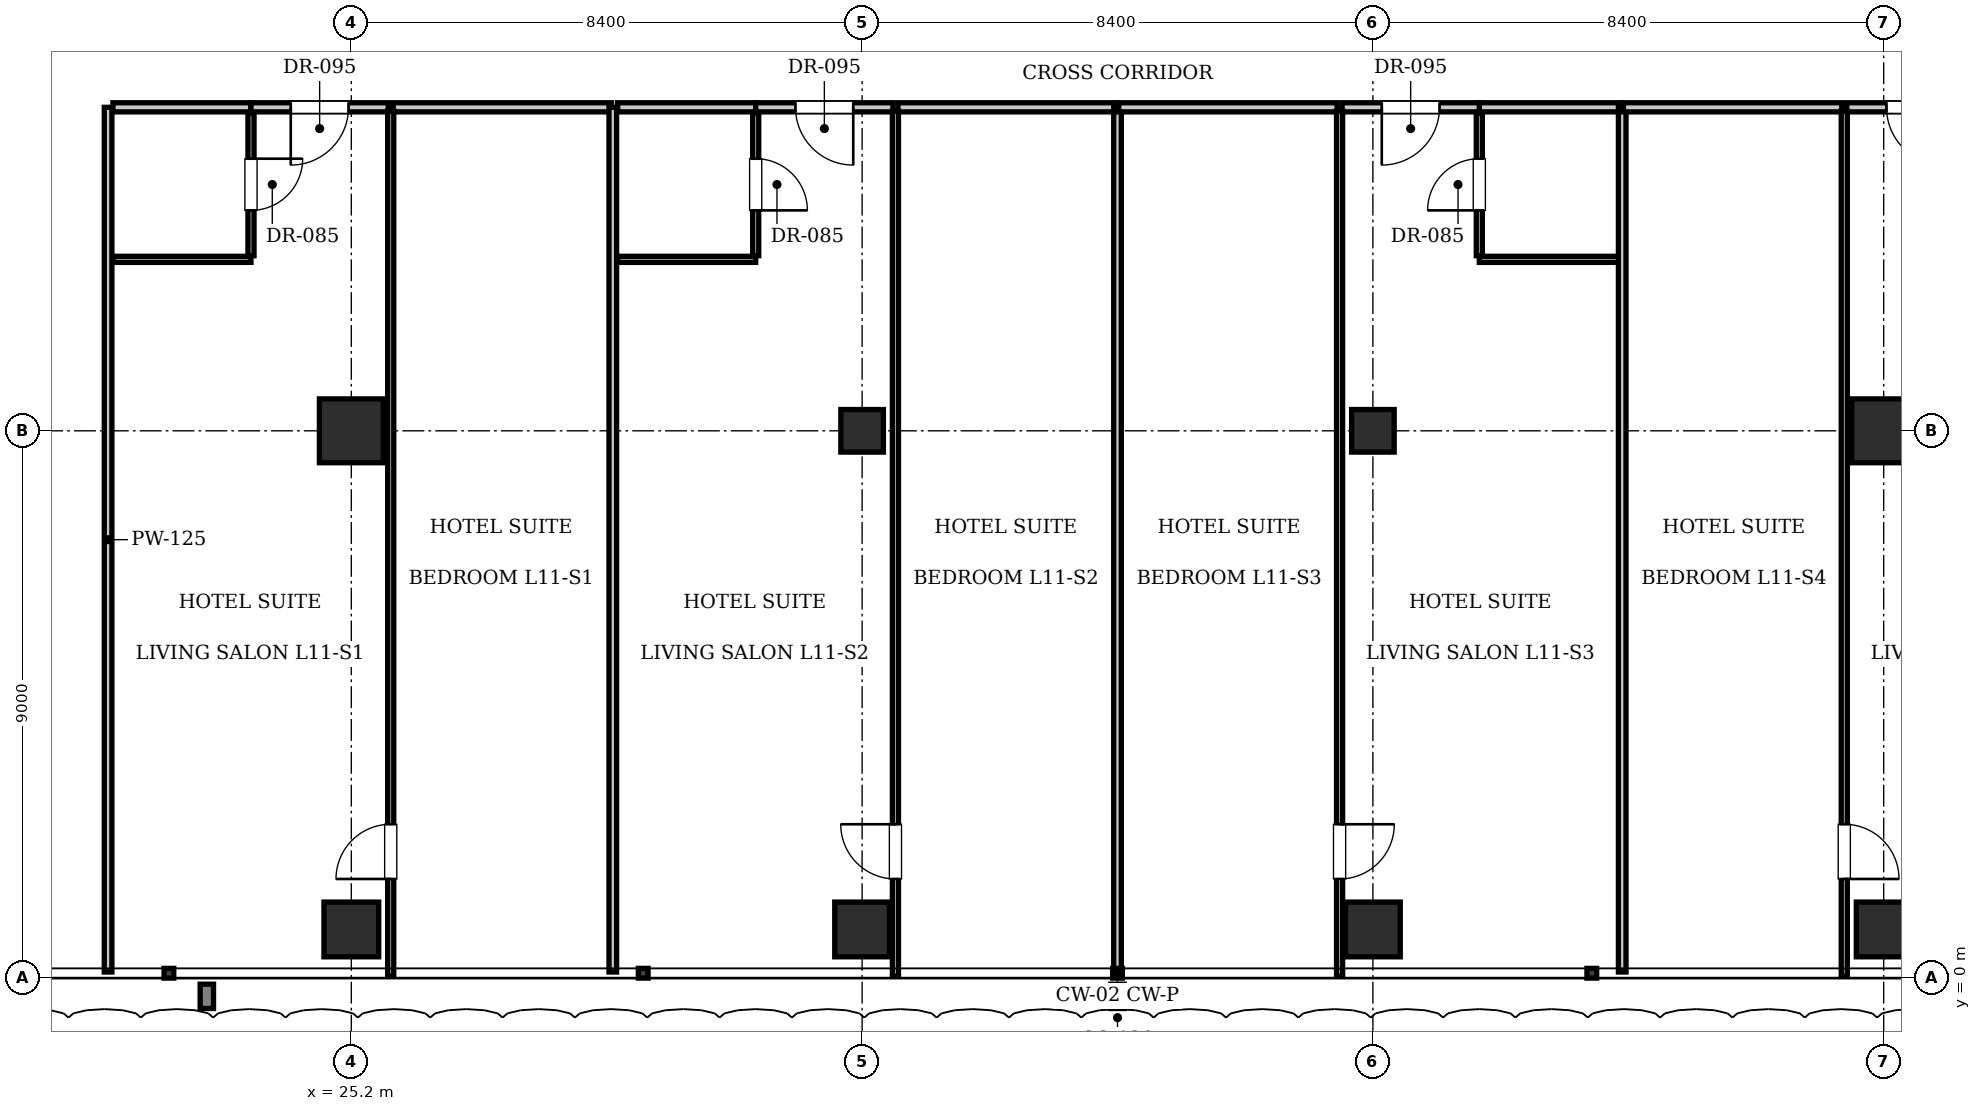
"""IFC4 building model, lengths in metres.
Left out: names, types, materials, properties, quantities, classifications, styles, units other than length and angle.
Written with IfcOpenShell. Run it as: python <this file> out.ifc"""

import sys

from ifc_helpers import new_model, si_unit, direction, frame, frame_2d, origin, origin_2d, place, context, subcontext, project, spatial, rectangle, i_section, extrude, element, fill, save


model = new_model("IFC4")
c1 = context("Model", 3, precision=1e-05, world=origin(), true_north=direction((0.0, 1.0)))
c2 = subcontext(c1, "Body", "Model", "MODEL_VIEW")
j1 = project(units=[si_unit("LENGTHUNIT", "METRE"), si_unit("PLANEANGLEUNIT", "RADIAN")], contexts=[c1])
p1 = place(None, origin())
s1 = spatial("IfcSite", under=j1, at=p1, CompositionType="ELEMENT")
p2 = place(p1, origin())
s2 = spatial("IfcBuilding", under=s1, at=p2, CompositionType="ELEMENT")
p3 = place(p2, frame((0.0, 0.0, 50.05)))
s3 = spatial("IfcBuildingStorey", under=s2, at=p3, CompositionType="ELEMENT", Elevation=50.05)
for number, where, z_axis, x_axis in (
    (1, (25.2, 9.0, 0.0), (0.0, 0.0, 1.0), (1.0, 0.0, 0.0)),
    (2, (50.4, 9.0, 0.0), (0.0, 0.0, 1.0), (1.0, 0.0, 0.0)),
):
    element("IfcColumn", number, at=place(p3, frame(where, z_axis=z_axis, x_axis=x_axis)), inside=s3, PredefinedType="COLUMN", context=c2, shape_type="SweptSolid", body=[
        extrude(rectangle(XDim=1.05, YDim=1.05, at=origin_2d()), origin(), (0.0, 0.0, 1.0), 3.85),
    ])
for number, where, z_axis, x_axis in (
    (3, (33.6, 9.0, 0.0), (0.0, 0.0, 1.0), (1.0, 0.0, 0.0)),
    (4, (42.0, 9.0, 0.0), (0.0, 0.0, 1.0), (1.0, 0.0, 0.0)),
):
    element("IfcColumn", number, at=place(p3, frame(where, z_axis=z_axis, x_axis=x_axis)), inside=s3, PredefinedType="COLUMN", context=c2, shape_type="SweptSolid", body=[
        extrude(i_section(OverallWidth=0.7, OverallDepth=0.7, WebThickness=0.028, FlangeThickness=0.044, at=origin_2d()), origin(), (0.0, 0.0, 1.0), 3.85),
    ])
for number, where, z_axis, x_axis in (
    (5, (25.2, 0.8, 0.0), (0.0, 0.0, 1.0), (1.0, 0.0, 0.0)),
    (6, (33.6, 0.8, 0.0), (0.0, 0.0, 1.0), (1.0, 0.0, 0.0)),
    (7, (42.0, 0.8, 0.0), (0.0, 0.0, 1.0), (1.0, 0.0, 0.0)),
    (8, (50.4, 0.8, 0.0), (0.0, 0.0, 1.0), (1.0, 0.0, 0.0)),
):
    element("IfcColumn", number, at=place(p3, frame(where, z_axis=z_axis, x_axis=x_axis)), inside=s3, PredefinedType="COLUMN", context=c2, shape_type="SweptSolid", body=[
        extrude(rectangle(XDim=0.9, YDim=0.9, at=origin_2d()), origin(), (0.0, 0.0, 1.0), 3.85),
    ])
p4 = place(p3, frame((21.2, 0.1, 0.0), z_axis=(0.0, 0.0, 1.0), x_axis=(0.0, 1.0, 0.0)))
e9 = element("IfcWall", 9, at=p4, inside=s3, PredefinedType="PARTITIONING", context=c2, shape_type="SweptSolid", body=[
    extrude(rectangle(XDim=14.22, YDim=0.125, at=frame_2d((7.11, 0.0))), origin(), (0.0, 0.0, 1.0), 3.61),
])
p5 = place(p3, frame((21.28, 14.32, 0.0), z_axis=(0.0, 0.0, 1.0), x_axis=(1.0, 0.0, 0.0)))
e10 = element("IfcWall", 10, at=p5, inside=s3, PredefinedType="PARTITIONING", context=c2, shape_type="SweptSolid", body=[
    extrude(rectangle(XDim=2.27, YDim=0.15, at=frame_2d((1.135, 0.0))), origin(), (0.0, 0.0, 1.0), 3.61),
])
p6 = place(p3, frame((21.28, 11.82, 0.0), z_axis=(0.0, 0.0, 1.0), x_axis=(1.0, 0.0, 0.0)))
e11 = element("IfcWall", 11, at=p6, inside=s3, PredefinedType="PARTITIONING", context=c2, shape_type="SweptSolid", body=[
    extrude(rectangle(XDim=2.27, YDim=0.1, at=frame_2d((1.135, 0.0))), origin(), (0.0, 0.0, 1.0), 3.61),
])
p7 = place(p3, frame((23.55, 11.88, 0.0), z_axis=(0.0, 0.0, 1.0), x_axis=(0.0, 1.0, 0.0)))
e12 = element("IfcWall", 12, at=p7, inside=s3, PredefinedType="PARTITIONING", context=c2, shape_type="SweptSolid", body=[
    extrude(rectangle(XDim=2.34, YDim=0.1, at=frame_2d((1.17, 0.0))), origin(), (0.0, 0.0, 1.0), 3.61),
])
p8 = place(p7, frame((0.745, 0.0, 0.0)))
e13 = element("IfcOpeningElement", 13, at=p8, cuts=e12, PredefinedType="OPENING", context=c2, shape_type="SweptSolid", body=[
    extrude(rectangle(XDim=0.85, YDim=2.1, at=frame_2d((0.425, 1.05))), frame((0.0, 0.06, 0.0), z_axis=(0.0, -1.0, 0.0), x_axis=(1.0, 0.0, 0.0)), (0.0, 0.0, 1.0), 0.12),
])
p9 = place(p3, frame((23.55, 14.32, 0.0), z_axis=(0.0, 0.0, 1.0), x_axis=(1.0, 0.0, 0.0)))
e14 = element("IfcWall", 14, at=p9, inside=s3, PredefinedType="PARTITIONING", context=c2, shape_type="SweptSolid", body=[
    extrude(rectangle(XDim=2.258, YDim=0.15, at=frame_2d((1.129, 0.0))), origin(), (0.0, 0.0, 1.0), 3.61),
])
p10 = place(p9, frame((0.654, 0.0, 0.0)))
e15 = element("IfcOpeningElement", 15, at=p10, cuts=e14, PredefinedType="OPENING", context=c2, shape_type="SweptSolid", body=[
    extrude(rectangle(XDim=0.95, YDim=2.15, at=frame_2d((0.475, 1.075))), frame((0.0, 0.085, 0.0), z_axis=(0.0, -1.0, 0.0), x_axis=(1.0, 0.0, 0.0)), (0.0, 0.0, 1.0), 0.17),
])
p11 = place(p3, frame((25.888, 14.32, 0.0), z_axis=(0.0, 0.0, 1.0), x_axis=(1.0, 0.0, 0.0)))
e16 = element("IfcWall", 16, at=p11, inside=s3, PredefinedType="PARTITIONING", context=c2, shape_type="SweptSolid", body=[
    extrude(rectangle(XDim=3.592, YDim=0.15, at=frame_2d((1.796, 0.0))), origin(), (0.0, 0.0, 1.0), 3.61),
])
p12 = place(p3, frame((25.848, 0.03, 0.0), z_axis=(0.0, 0.0, 1.0), x_axis=(0.0, 1.0, 0.0)))
e17 = element("IfcWall", 17, at=p12, inside=s3, PredefinedType="PARTITIONING", context=c2, shape_type="SweptSolid", body=[
    extrude(rectangle(XDim=14.23, YDim=0.1, at=frame_2d((7.115, 0.0))), origin(), (0.0, 0.0, 1.0), 3.61),
])
p13 = place(p12, frame((1.6, 0.0, 0.0)))
e18 = element("IfcOpeningElement", 18, at=p13, cuts=e17, PredefinedType="OPENING", context=c2, shape_type="SweptSolid", body=[
    extrude(rectangle(XDim=0.9, YDim=2.1, at=frame_2d((0.45, 1.05))), frame((0.0, 0.06, 0.0), z_axis=(0.0, -1.0, 0.0), x_axis=(1.0, 0.0, 0.0)), (0.0, 0.0, 1.0), 0.12),
])
p14 = place(p3, frame((29.5, 0.1, 0.0), z_axis=(0.0, 0.0, 1.0), x_axis=(0.0, 1.0, 0.0)))
e19 = element("IfcWall", 19, at=p14, inside=s3, PredefinedType="PARTITIONING", context=c2, shape_type="SweptSolid", body=[
    extrude(rectangle(XDim=14.22, YDim=0.125, at=frame_2d((7.11, 0.0))), origin(), (0.0, 0.0, 1.0), 3.255),
])
p15 = place(p3, frame((29.58, 14.32, 0.0), z_axis=(0.0, 0.0, 1.0), x_axis=(1.0, 0.0, 0.0)))
e20 = element("IfcWall", 20, at=p15, inside=s3, PredefinedType="PARTITIONING", context=c2, shape_type="SweptSolid", body=[
    extrude(rectangle(XDim=2.27, YDim=0.15, at=frame_2d((1.135, 0.0))), origin(), (0.0, 0.0, 1.0), 3.61),
])
p16 = place(p3, frame((29.58, 11.82, 0.0), z_axis=(0.0, 0.0, 1.0), x_axis=(1.0, 0.0, 0.0)))
e21 = element("IfcWall", 21, at=p16, inside=s3, PredefinedType="PARTITIONING", context=c2, shape_type="SweptSolid", body=[
    extrude(rectangle(XDim=2.27, YDim=0.1, at=frame_2d((1.135, 0.0))), origin(), (0.0, 0.0, 1.0), 3.61),
])
p17 = place(p3, frame((31.85, 11.88, 0.0), z_axis=(0.0, 0.0, 1.0), x_axis=(0.0, 1.0, 0.0)))
e22 = element("IfcWall", 22, at=p17, inside=s3, PredefinedType="PARTITIONING", context=c2, shape_type="SweptSolid", body=[
    extrude(rectangle(XDim=2.34, YDim=0.1, at=frame_2d((1.17, 0.0))), origin(), (0.0, 0.0, 1.0), 3.61),
])
p18 = place(p17, frame((0.745, 0.0, 0.0)))
e23 = element("IfcOpeningElement", 23, at=p18, cuts=e22, PredefinedType="OPENING", context=c2, shape_type="SweptSolid", body=[
    extrude(rectangle(XDim=0.85, YDim=2.1, at=frame_2d((0.425, 1.05))), frame((0.0, 0.06, 0.0), z_axis=(0.0, -1.0, 0.0), x_axis=(1.0, 0.0, 0.0)), (0.0, 0.0, 1.0), 0.12),
])
p19 = place(p3, frame((31.85, 14.32, 0.0), z_axis=(0.0, 0.0, 1.0), x_axis=(1.0, 0.0, 0.0)))
e24 = element("IfcWall", 24, at=p19, inside=s3, PredefinedType="PARTITIONING", context=c2, shape_type="SweptSolid", body=[
    extrude(rectangle(XDim=2.258, YDim=0.15, at=frame_2d((1.129, 0.0))), origin(), (0.0, 0.0, 1.0), 3.61),
])
p20 = place(p19, frame((0.654, 0.0, 0.0)))
e25 = element("IfcOpeningElement", 25, at=p20, cuts=e24, PredefinedType="OPENING", context=c2, shape_type="SweptSolid", body=[
    extrude(rectangle(XDim=0.95, YDim=2.15, at=frame_2d((0.475, 1.075))), frame((0.0, 0.085, 0.0), z_axis=(0.0, -1.0, 0.0), x_axis=(1.0, 0.0, 0.0)), (0.0, 0.0, 1.0), 0.17),
])
p21 = place(p3, frame((34.188, 14.32, 0.0), z_axis=(0.0, 0.0, 1.0), x_axis=(1.0, 0.0, 0.0)))
e26 = element("IfcWall", 26, at=p21, inside=s3, PredefinedType="PARTITIONING", context=c2, shape_type="SweptSolid", body=[
    extrude(rectangle(XDim=3.592, YDim=0.15, at=frame_2d((1.796, 0.0))), origin(), (0.0, 0.0, 1.0), 3.61),
])
p22 = place(p3, frame((34.148, 0.03, 0.0), z_axis=(0.0, 0.0, 1.0), x_axis=(0.0, 1.0, 0.0)))
e27 = element("IfcWall", 27, at=p22, inside=s3, PredefinedType="PARTITIONING", context=c2, shape_type="SweptSolid", body=[
    extrude(rectangle(XDim=14.23, YDim=0.1, at=frame_2d((7.115, 0.0))), origin(), (0.0, 0.0, 1.0), 3.61),
])
p23 = place(p22, frame((1.6, 0.0, 0.0)))
e28 = element("IfcOpeningElement", 28, at=p23, cuts=e27, PredefinedType="OPENING", context=c2, shape_type="SweptSolid", body=[
    extrude(rectangle(XDim=0.9, YDim=2.1, at=frame_2d((0.45, 1.05))), frame((0.0, 0.06, 0.0), z_axis=(0.0, -1.0, 0.0), x_axis=(1.0, 0.0, 0.0)), (0.0, 0.0, 1.0), 0.12),
])
p24 = place(p3, frame((37.8, 0.1, 0.0), z_axis=(0.0, 0.0, 1.0), x_axis=(0.0, 1.0, 0.0)))
e29 = element("IfcWall", 29, at=p24, inside=s3, PredefinedType="PARTITIONING", context=c2, shape_type="SweptSolid", body=[
    extrude(rectangle(XDim=14.22, YDim=0.125, at=frame_2d((7.11, 0.0))), origin(), (0.0, 0.0, 1.0), 3.293),
])
p25 = place(p3, frame((43.75, 14.32, 0.0), z_axis=(0.0, 0.0, 1.0), x_axis=(1.0, 0.0, 0.0)))
e30 = element("IfcWall", 30, at=p25, inside=s3, PredefinedType="PARTITIONING", context=c2, shape_type="SweptSolid", body=[
    extrude(rectangle(XDim=2.33, YDim=0.15, at=frame_2d((1.165, 0.0))), origin(), (0.0, 0.0, 1.0), 3.61),
])
p26 = place(p3, frame((43.75, 11.82, 0.0), z_axis=(0.0, 0.0, 1.0), x_axis=(1.0, 0.0, 0.0)))
e31 = element("IfcWall", 31, at=p26, inside=s3, PredefinedType="PARTITIONING", context=c2, shape_type="SweptSolid", body=[
    extrude(rectangle(XDim=2.31, YDim=0.1, at=frame_2d((1.155, 0.0))), origin(), (0.0, 0.0, 1.0), 3.61),
])
p27 = place(p3, frame((43.75, 11.88, 0.0), z_axis=(0.0, 0.0, 1.0), x_axis=(0.0, 1.0, 0.0)))
e32 = element("IfcWall", 32, at=p27, inside=s3, PredefinedType="PARTITIONING", context=c2, shape_type="SweptSolid", body=[
    extrude(rectangle(XDim=2.34, YDim=0.1, at=frame_2d((1.17, 0.0))), origin(), (0.0, 0.0, 1.0), 3.61),
])
p28 = place(p27, frame((0.745, 0.0, 0.0)))
e33 = element("IfcOpeningElement", 33, at=p28, cuts=e32, PredefinedType="OPENING", context=c2, shape_type="SweptSolid", body=[
    extrude(rectangle(XDim=0.85, YDim=2.1, at=frame_2d((0.425, 1.05))), frame((0.0, 0.06, 0.0), z_axis=(0.0, -1.0, 0.0), x_axis=(1.0, 0.0, 0.0)), (0.0, 0.0, 1.0), 0.12),
])
p29 = place(p3, frame((37.82, 14.32, 0.0), z_axis=(0.0, 0.0, 1.0), x_axis=(1.0, 0.0, 0.0)))
e34 = element("IfcWall", 34, at=p29, inside=s3, PredefinedType="PARTITIONING", context=c2, shape_type="SweptSolid", body=[
    extrude(rectangle(XDim=3.592, YDim=0.15, at=frame_2d((1.796, 0.0))), origin(), (0.0, 0.0, 1.0), 3.61),
])
p30 = place(p3, frame((41.492, 14.32, 0.0), z_axis=(0.0, 0.0, 1.0), x_axis=(1.0, 0.0, 0.0)))
e35 = element("IfcWall", 35, at=p30, inside=s3, PredefinedType="PARTITIONING", context=c2, shape_type="SweptSolid", body=[
    extrude(rectangle(XDim=2.258, YDim=0.15, at=frame_2d((1.129, 0.0))), origin(), (0.0, 0.0, 1.0), 3.61),
])
p31 = place(p30, frame((0.654, 0.0, 0.0)))
e36 = element("IfcOpeningElement", 36, at=p31, cuts=e35, PredefinedType="OPENING", context=c2, shape_type="SweptSolid", body=[
    extrude(rectangle(XDim=0.95, YDim=2.15, at=frame_2d((0.475, 1.075))), frame((0.0, 0.085, 0.0), z_axis=(0.0, -1.0, 0.0), x_axis=(1.0, 0.0, 0.0)), (0.0, 0.0, 1.0), 0.17),
])
p32 = place(p3, frame((41.452, 0.03, 0.0), z_axis=(0.0, 0.0, 1.0), x_axis=(0.0, 1.0, 0.0)))
e37 = element("IfcWall", 37, at=p32, inside=s3, PredefinedType="PARTITIONING", context=c2, shape_type="SweptSolid", body=[
    extrude(rectangle(XDim=14.23, YDim=0.1, at=frame_2d((7.115, 0.0))), origin(), (0.0, 0.0, 1.0), 3.61),
])
p33 = place(p32, frame((1.6, 0.0, 0.0)))
e38 = element("IfcOpeningElement", 38, at=p33, cuts=e37, PredefinedType="OPENING", context=c2, shape_type="SweptSolid", body=[
    extrude(rectangle(XDim=0.9, YDim=2.1, at=frame_2d((0.45, 1.05))), frame((0.0, 0.06, 0.0), z_axis=(0.0, -1.0, 0.0), x_axis=(1.0, 0.0, 0.0)), (0.0, 0.0, 1.0), 0.12),
])
p34 = place(p3, frame((46.1, 0.1, 0.0), z_axis=(0.0, 0.0, 1.0), x_axis=(0.0, 1.0, 0.0)))
e39 = element("IfcWall", 39, at=p34, inside=s3, PredefinedType="PARTITIONING", context=c2, shape_type="SweptSolid", body=[
    extrude(rectangle(XDim=14.22, YDim=0.125, at=frame_2d((7.11, 0.0))), origin(), (0.0, 0.0, 1.0), 3.344),
])
p35 = place(p3, frame((46.12, 14.32, 0.0), z_axis=(0.0, 0.0, 1.0), x_axis=(1.0, 0.0, 0.0)))
e40 = element("IfcWall", 40, at=p35, inside=s3, PredefinedType="PARTITIONING", context=c2, shape_type="SweptSolid", body=[
    extrude(rectangle(XDim=3.592, YDim=0.15, at=frame_2d((1.796, 0.0))), origin(), (0.0, 0.0, 1.0), 3.61),
])
p36 = place(p3, frame((49.792, 14.32, 0.0), z_axis=(0.0, 0.0, 1.0), x_axis=(1.0, 0.0, 0.0)))
e41 = element("IfcWall", 41, at=p36, inside=s3, PredefinedType="PARTITIONING", context=c2, shape_type="SweptSolid", body=[
    extrude(rectangle(XDim=2.258, YDim=0.15, at=frame_2d((1.129, 0.0))), origin(), (0.0, 0.0, 1.0), 3.61),
])
p37 = place(p36, frame((0.654, 0.0, 0.0)))
e42 = element("IfcOpeningElement", 42, at=p37, cuts=e41, PredefinedType="OPENING", context=c2, shape_type="SweptSolid", body=[
    extrude(rectangle(XDim=0.95, YDim=2.15, at=frame_2d((0.475, 1.075))), frame((0.0, 0.085, 0.0), z_axis=(0.0, -1.0, 0.0), x_axis=(1.0, 0.0, 0.0)), (0.0, 0.0, 1.0), 0.17),
])
p38 = place(p3, frame((49.752, 0.03, 0.0), z_axis=(0.0, 0.0, 1.0), x_axis=(0.0, 1.0, 0.0)))
e43 = element("IfcWall", 43, at=p38, inside=s3, PredefinedType="PARTITIONING", context=c2, shape_type="SweptSolid", body=[
    extrude(rectangle(XDim=14.23, YDim=0.1, at=frame_2d((7.115, 0.0))), origin(), (0.0, 0.0, 1.0), 3.61),
])
p39 = place(p38, frame((1.6, 0.0, 0.0)))
e44 = element("IfcOpeningElement", 44, at=p39, cuts=e43, PredefinedType="OPENING", context=c2, shape_type="SweptSolid", body=[
    extrude(rectangle(XDim=0.9, YDim=2.1, at=frame_2d((0.45, 1.05))), frame((0.0, 0.06, 0.0), z_axis=(0.0, -1.0, 0.0), x_axis=(1.0, 0.0, 0.0)), (0.0, 0.0, 1.0), 0.12),
])
p40 = place(p8, frame((0.85, 0.0, 0.0), z_axis=(0.0, 0.0, 1.0), x_axis=(-1.0, 0.0, 0.0)))
e45 = element("IfcDoor", 45, at=p40, inside=s3, OperationType="SINGLE_SWING_LEFT", PredefinedType="DOOR", context=c2, shape_type="SweptSolid", body=[
    extrude(rectangle(XDim=0.85, YDim=2.1, at=frame_2d((0.425, 1.05))), frame((0.0, 0.025, 0.0), z_axis=(0.0, -1.0, 0.0), x_axis=(1.0, 0.0, 0.0)), (0.0, 0.0, 1.0), 0.05),
])
fill(e13, e45)
p41 = place(p10, frame((0.95, 0.0, 0.0), z_axis=(0.0, 0.0, 1.0), x_axis=(-1.0, 0.0, 0.0)))
e46 = element("IfcDoor", 46, at=p41, inside=s3, OperationType="SINGLE_SWING_RIGHT", PredefinedType="DOOR", context=c2, shape_type="SweptSolid", body=[
    extrude(rectangle(XDim=0.95, YDim=2.15, at=frame_2d((0.475, 1.075))), frame((0.0, 0.025, 0.0), z_axis=(0.0, -1.0, 0.0), x_axis=(1.0, 0.0, 0.0)), (0.0, 0.0, 1.0), 0.05),
])
fill(e15, e46)
p42 = place(p13, origin())
e47 = element("IfcDoor", 47, at=p42, inside=s3, OperationType="SINGLE_SWING_LEFT", PredefinedType="DOOR", context=c2, shape_type="SweptSolid", body=[
    extrude(rectangle(XDim=0.9, YDim=2.1, at=frame_2d((0.45, 1.05))), frame((0.0, 0.025, 0.0), z_axis=(0.0, -1.0, 0.0), x_axis=(1.0, 0.0, 0.0)), (0.0, 0.0, 1.0), 0.05),
])
fill(e18, e47)
p43 = place(p18, frame((0.85, 0.0, 0.0), z_axis=(0.0, 0.0, 1.0), x_axis=(-1.0, 0.0, 0.0)))
e48 = element("IfcDoor", 48, at=p43, inside=s3, OperationType="SINGLE_SWING_RIGHT", PredefinedType="DOOR", context=c2, shape_type="SweptSolid", body=[
    extrude(rectangle(XDim=0.85, YDim=2.1, at=frame_2d((0.425, 1.05))), frame((0.0, 0.025, 0.0), z_axis=(0.0, -1.0, 0.0), x_axis=(1.0, 0.0, 0.0)), (0.0, 0.0, 1.0), 0.05),
])
fill(e23, e48)
p44 = place(p20, frame((0.95, 0.0, 0.0), z_axis=(0.0, 0.0, 1.0), x_axis=(-1.0, 0.0, 0.0)))
e49 = element("IfcDoor", 49, at=p44, inside=s3, OperationType="SINGLE_SWING_LEFT", PredefinedType="DOOR", context=c2, shape_type="SweptSolid", body=[
    extrude(rectangle(XDim=0.95, YDim=2.15, at=frame_2d((0.475, 1.075))), frame((0.0, 0.025, 0.0), z_axis=(0.0, -1.0, 0.0), x_axis=(1.0, 0.0, 0.0)), (0.0, 0.0, 1.0), 0.05),
])
fill(e25, e49)
p45 = place(p23, origin())
e50 = element("IfcDoor", 50, at=p45, inside=s3, OperationType="SINGLE_SWING_RIGHT", PredefinedType="DOOR", context=c2, shape_type="SweptSolid", body=[
    extrude(rectangle(XDim=0.9, YDim=2.1, at=frame_2d((0.45, 1.05))), frame((0.0, 0.025, 0.0), z_axis=(0.0, -1.0, 0.0), x_axis=(1.0, 0.0, 0.0)), (0.0, 0.0, 1.0), 0.05),
])
fill(e28, e50)
p46 = place(p28, origin())
e51 = element("IfcDoor", 51, at=p46, inside=s3, OperationType="SINGLE_SWING_LEFT", PredefinedType="DOOR", context=c2, shape_type="SweptSolid", body=[
    extrude(rectangle(XDim=0.85, YDim=2.1, at=frame_2d((0.425, 1.05))), frame((0.0, 0.025, 0.0), z_axis=(0.0, -1.0, 0.0), x_axis=(1.0, 0.0, 0.0)), (0.0, 0.0, 1.0), 0.05),
])
fill(e33, e51)
p47 = place(p31, frame((0.95, 0.0, 0.0), z_axis=(0.0, 0.0, 1.0), x_axis=(-1.0, 0.0, 0.0)))
e52 = element("IfcDoor", 52, at=p47, inside=s3, OperationType="SINGLE_SWING_RIGHT", PredefinedType="DOOR", context=c2, shape_type="SweptSolid", body=[
    extrude(rectangle(XDim=0.95, YDim=2.15, at=frame_2d((0.475, 1.075))), frame((0.0, 0.025, 0.0), z_axis=(0.0, -1.0, 0.0), x_axis=(1.0, 0.0, 0.0)), (0.0, 0.0, 1.0), 0.05),
])
fill(e36, e52)
p48 = place(p33, frame((0.9, 0.0, 0.0), z_axis=(0.0, 0.0, 1.0), x_axis=(-1.0, 0.0, 0.0)))
e53 = element("IfcDoor", 53, at=p48, inside=s3, OperationType="SINGLE_SWING_LEFT", PredefinedType="DOOR", context=c2, shape_type="SweptSolid", body=[
    extrude(rectangle(XDim=0.9, YDim=2.1, at=frame_2d((0.45, 1.05))), frame((0.0, 0.025, 0.0), z_axis=(0.0, -1.0, 0.0), x_axis=(1.0, 0.0, 0.0)), (0.0, 0.0, 1.0), 0.05),
])
fill(e38, e53)
p49 = place(p37, frame((0.95, 0.0, 0.0), z_axis=(0.0, 0.0, 1.0), x_axis=(-1.0, 0.0, 0.0)))
e54 = element("IfcDoor", 54, at=p49, inside=s3, OperationType="SINGLE_SWING_LEFT", PredefinedType="DOOR", context=c2, shape_type="SweptSolid", body=[
    extrude(rectangle(XDim=0.95, YDim=2.15, at=frame_2d((0.475, 1.075))), frame((0.0, 0.025, 0.0), z_axis=(0.0, -1.0, 0.0), x_axis=(1.0, 0.0, 0.0)), (0.0, 0.0, 1.0), 0.05),
])
fill(e42, e54)
p50 = place(p39, frame((0.9, 0.0, 0.0), z_axis=(0.0, 0.0, 1.0), x_axis=(-1.0, 0.0, 0.0)))
e55 = element("IfcDoor", 55, at=p50, inside=s3, OperationType="SINGLE_SWING_RIGHT", PredefinedType="DOOR", context=c2, shape_type="SweptSolid", body=[
    extrude(rectangle(XDim=0.9, YDim=2.1, at=frame_2d((0.45, 1.05))), frame((0.0, 0.025, 0.0), z_axis=(0.0, -1.0, 0.0), x_axis=(1.0, 0.0, 0.0)), (0.0, 0.0, 1.0), 0.05),
])
fill(e44, e55)
save(model, sys.argv[1])
